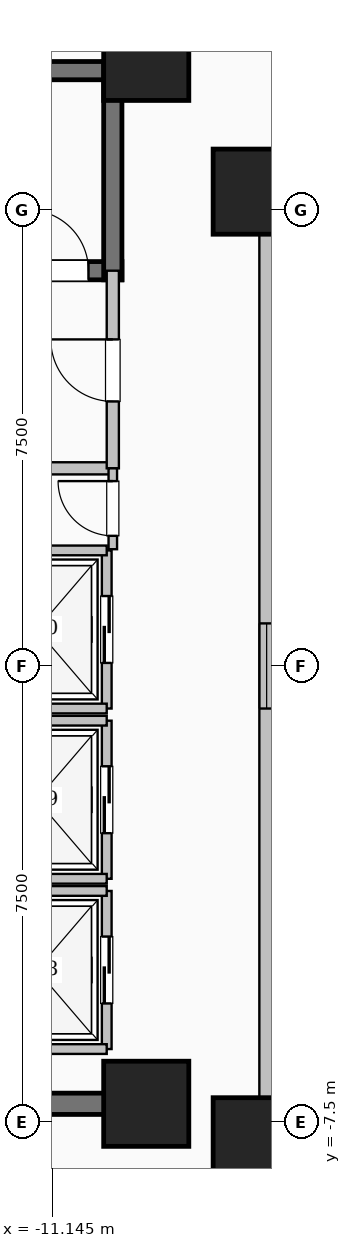
"""IFC4 building model, lengths in metres.
Left out: names, types, materials, properties, quantities, classifications, styles, units other than length and angle.
Written with IfcOpenShell. Run it as: python <this file> out.ifc"""

import sys

from ifc_helpers import new_model, si_unit, direction, frame, frame_2d, origin, origin_2d, place, context, subcontext, project, spatial, rectangle, extrude, element, fill, save


model = new_model("IFC4")
c1 = context("Model", 3, precision=1e-05, world=origin(), true_north=direction((0.0, 1.0)))
c2 = subcontext(c1, "Body", "Model", "MODEL_VIEW")
j1 = project(units=[si_unit("LENGTHUNIT", "METRE"), si_unit("PLANEANGLEUNIT", "RADIAN")], contexts=[c1])
p1 = place(None, origin())
s1 = spatial("IfcSite", under=j1, at=p1, CompositionType="ELEMENT")
p2 = place(p1, origin())
s2 = spatial("IfcBuilding", under=s1, at=p2, CompositionType="ELEMENT")
p3 = place(p2, frame((0.0, 0.0, 5.4)))
s3 = spatial("IfcBuildingStorey", under=s2, at=p3, CompositionType="ELEMENT", Elevation=5.4)
for number, where, z_axis, x_axis in (
    (1, (-7.8, -7.8, 0.0), (0.0, 0.0, 1.0), (1.0, 0.0, 0.0)),
    (2, (-7.8, 7.8, 0.0), (0.0, 0.0, 1.0), (1.0, 0.0, 0.0)),
    (3, (-9.6, -7.2, 0.0), (0.0, 0.0, 1.0), (1.0, 0.0, 0.0)),
    (4, (-9.6, 10.0, 0.0), (0.0, 0.0, 1.0), (1.0, 0.0, 0.0)),
):
    element("IfcColumn", number, at=place(p3, frame(where, z_axis=z_axis, x_axis=x_axis)), inside=s3, PredefinedType="COLUMN", context=c2, shape_type="SweptSolid", body=[
        extrude(rectangle(XDim=1.4, YDim=1.4, at=origin_2d()), origin(), (0.0, 0.0, 1.0), 4.5),
    ])
p4 = place(p3, frame((-7.62, -7.62, 0.0), z_axis=(0.0, 0.0, 1.0), x_axis=(1.0, 0.0, 0.0)))
e5 = element("IfcWall", 5, at=p4, inside=s3, PredefinedType="SOLIDWALL", context=c2, shape_type="SweptSolid", body=[
    extrude(rectangle(XDim=15.24, YDim=0.24, at=frame_2d((7.62, 0.0))), origin(), (0.0, 0.0, 1.0), 4.2),
])
p5 = place(p4, frame((6.92, 0.0, 0.95)))
e6 = element("IfcOpeningElement", 6, at=p5, cuts=e5, PredefinedType="OPENING", context=c2, shape_type="SweptSolid", body=[
    extrude(rectangle(XDim=1.4, YDim=1.5, at=frame_2d((0.7, 0.75))), frame((0.0, 0.13, 0.0), z_axis=(0.0, -1.0, 0.0), x_axis=(1.0, 0.0, 0.0)), (0.0, 0.0, 1.0), 0.26),
])
p6 = place(p3, frame((7.62, 7.62, 0.0), z_axis=(0.0, 0.0, 1.0), x_axis=(-1.0, 0.0, 0.0)))
e7 = element("IfcWall", 7, at=p6, inside=s3, PredefinedType="SOLIDWALL", context=c2, shape_type="SweptSolid", body=[
    extrude(rectangle(XDim=15.24, YDim=0.24, at=frame_2d((7.62, 0.0))), origin(), (0.0, 0.0, 1.0), 4.2),
])
p7 = place(p6, frame((6.92, 0.0, 0.95)))
e8 = element("IfcOpeningElement", 8, at=p7, cuts=e7, PredefinedType="OPENING", context=c2, shape_type="SweptSolid", body=[
    extrude(rectangle(XDim=1.4, YDim=1.5, at=frame_2d((0.7, 0.75))), frame((0.0, 0.13, 0.0), z_axis=(0.0, -1.0, 0.0), x_axis=(1.0, 0.0, 0.0)), (0.0, 0.0, 1.0), 0.26),
])
p8 = place(p3, frame((-7.62, 7.62, 0.0), z_axis=(0.0, 0.0, 1.0), x_axis=(0.0, -1.0, 0.0)))
e9 = element("IfcWall", 9, at=p8, inside=s3, PredefinedType="SOLIDWALL", context=c2, shape_type="SweptSolid", body=[
    extrude(rectangle(XDim=15.24, YDim=0.24, at=frame_2d((7.62, 0.0))), origin(), (0.0, 0.0, 1.0), 4.2),
])
p9 = place(p8, frame((6.92, 0.0, 0.95)))
e10 = element("IfcOpeningElement", 10, at=p9, cuts=e9, PredefinedType="OPENING", context=c2, shape_type="SweptSolid", body=[
    extrude(rectangle(XDim=1.4, YDim=1.5, at=frame_2d((0.7, 0.75))), frame((0.0, 0.13, 0.0), z_axis=(0.0, -1.0, 0.0), x_axis=(1.0, 0.0, 0.0)), (0.0, 0.0, 1.0), 0.26),
])
p10 = place(p3, frame((-18.0, 9.79, 0.0), z_axis=(0.0, 0.0, 1.0), x_axis=(1.0, 0.0, 0.0)))
e11 = element("IfcWall", 11, at=p10, inside=s3, PredefinedType="SHEAR", context=c2, shape_type="SweptSolid", body=[
    extrude(rectangle(XDim=8.0, YDim=0.3, at=frame_2d((4.0, 0.0))), origin(), (0.0, 0.0, 1.0), 4.5),
])
p11 = place(p3, frame((-18.0, 6.5, 0.0), z_axis=(0.0, 0.0, 1.0), x_axis=(1.0, 0.0, 0.0)))
e12 = element("IfcWall", 12, at=p11, inside=s3, PredefinedType="SHEAR", context=c2, shape_type="SweptSolid", body=[
    extrude(rectangle(XDim=8.0, YDim=0.3, at=frame_2d((4.0, 0.0))), origin(), (0.0, 0.0, 1.0), 4.5),
])
p12 = place(p11, frame((6.45, 0.0, 0.0)))
e13 = element("IfcOpeningElement", 13, at=p12, cuts=e12, PredefinedType="OPENING", context=c2, shape_type="SweptSolid", body=[
    extrude(rectangle(XDim=1.0, YDim=2.15, at=frame_2d((0.5, 1.075))), frame((0.0, 0.16, 0.0), z_axis=(0.0, -1.0, 0.0), x_axis=(1.0, 0.0, 0.0)), (0.0, 0.0, 1.0), 0.32),
])
p13 = place(p3, frame((-10.15, 6.35, 0.0), z_axis=(0.0, 0.0, 1.0), x_axis=(0.0, 1.0, 0.0)))
e14 = element("IfcWall", 14, at=p13, inside=s3, PredefinedType="SHEAR", context=c2, shape_type="SweptSolid", body=[
    extrude(rectangle(XDim=3.59, YDim=0.3, at=frame_2d((1.795, 0.0))), origin(), (0.0, 0.0, 1.0), 4.5),
])
p14 = place(p3, frame((-15.55, 3.25, 0.0), z_axis=(0.0, 0.0, 1.0), x_axis=(1.0, 0.0, 0.0)))
e15 = element("IfcWall", 15, at=p14, inside=s3, PredefinedType="SOLIDWALL", context=c2, shape_type="SweptSolid", body=[
    extrude(rectangle(XDim=5.4, YDim=0.2, at=frame_2d((2.7, 0.0))), origin(), (0.0, 0.0, 1.0), 4.2),
])
p15 = place(p3, frame((-10.15, 3.25, 0.0), z_axis=(0.0, 0.0, 1.0), x_axis=(0.0, 1.0, 0.0)))
e16 = element("IfcWall", 16, at=p15, inside=s3, PredefinedType="SOLIDWALL", context=c2, shape_type="SweptSolid", body=[
    extrude(rectangle(XDim=3.25, YDim=0.2, at=frame_2d((1.625, 0.0))), origin(), (0.0, 0.0, 1.0), 4.2),
])
p16 = place(p15, frame((1.1, 0.0, 0.0)))
e17 = element("IfcOpeningElement", 17, at=p16, cuts=e16, PredefinedType="OPENING", context=c2, shape_type="SweptSolid", body=[
    extrude(rectangle(XDim=1.02, YDim=2.15, at=frame_2d((0.51, 1.075))), frame((0.0, 0.11, 0.0), z_axis=(0.0, -1.0, 0.0), x_axis=(1.0, 0.0, 0.0)), (0.0, 0.0, 1.0), 0.22),
])
p17 = place(p3, frame((-10.25, -6.3, 0.0), z_axis=(0.0, 0.0, 1.0), x_axis=(0.0, 1.0, 0.0)))
e18 = element("IfcWall", 18, at=p17, inside=s3, PredefinedType="SOLIDWALL", context=c2, shape_type="SweptSolid", body=[
    extrude(rectangle(XDim=2.6, YDim=0.16, at=frame_2d((1.3, 0.0))), origin(), (0.0, 0.0, 1.0), 4.2),
])
p18 = place(p17, frame((0.75, 0.0, 0.0)))
e19 = element("IfcOpeningElement", 19, at=p18, cuts=e18, PredefinedType="OPENING", context=c2, shape_type="SweptSolid", body=[
    extrude(rectangle(XDim=1.1, YDim=2.15, at=frame_2d((0.55, 1.075))), frame((0.0, 0.09, 0.0), z_axis=(0.0, -1.0, 0.0), x_axis=(1.0, 0.0, 0.0)), (0.0, 0.0, 1.0), 0.18),
])
for number, where, z_axis, x_axis in (
    (20, (-12.55, -6.3, 0.0), (0.0, 0.0, 1.0), (1.0, 0.0, 0.0)),
    (21, (-12.55, -3.7, 0.0), (0.0, 0.0, 1.0), (1.0, 0.0, 0.0)),
):
    element("IfcWall", number, at=place(p3, frame(where, z_axis=z_axis, x_axis=x_axis)), inside=s3, PredefinedType="SOLIDWALL", context=c2, shape_type="SweptSolid", body=[
        extrude(rectangle(XDim=2.3, YDim=0.16, at=frame_2d((1.15, 0.0))), origin(), (0.0, 0.0, 1.0), 4.2),
    ])
p19 = place(p3, frame((-10.25, -3.5, 0.0), z_axis=(0.0, 0.0, 1.0), x_axis=(0.0, 1.0, 0.0)))
e22 = element("IfcWall", 22, at=p19, inside=s3, PredefinedType="SOLIDWALL", context=c2, shape_type="SweptSolid", body=[
    extrude(rectangle(XDim=2.6, YDim=0.16, at=frame_2d((1.3, 0.0))), origin(), (0.0, 0.0, 1.0), 4.2),
])
p20 = place(p19, frame((0.75, 0.0, 0.0)))
e23 = element("IfcOpeningElement", 23, at=p20, cuts=e22, PredefinedType="OPENING", context=c2, shape_type="SweptSolid", body=[
    extrude(rectangle(XDim=1.1, YDim=2.15, at=frame_2d((0.55, 1.075))), frame((0.0, 0.09, 0.0), z_axis=(0.0, -1.0, 0.0), x_axis=(1.0, 0.0, 0.0)), (0.0, 0.0, 1.0), 0.18),
])
for number, where, z_axis, x_axis in (
    (24, (-12.55, -3.5, 0.0), (0.0, 0.0, 1.0), (1.0, 0.0, 0.0)),
    (25, (-12.55, -0.9, 0.0), (0.0, 0.0, 1.0), (1.0, 0.0, 0.0)),
):
    element("IfcWall", number, at=place(p3, frame(where, z_axis=z_axis, x_axis=x_axis)), inside=s3, PredefinedType="SOLIDWALL", context=c2, shape_type="SweptSolid", body=[
        extrude(rectangle(XDim=2.3, YDim=0.16, at=frame_2d((1.15, 0.0))), origin(), (0.0, 0.0, 1.0), 4.2),
    ])
p21 = place(p3, frame((-10.25, -0.7, 0.0), z_axis=(0.0, 0.0, 1.0), x_axis=(0.0, 1.0, 0.0)))
e26 = element("IfcWall", 26, at=p21, inside=s3, PredefinedType="SOLIDWALL", context=c2, shape_type="SweptSolid", body=[
    extrude(rectangle(XDim=2.6, YDim=0.16, at=frame_2d((1.3, 0.0))), origin(), (0.0, 0.0, 1.0), 4.2),
])
p22 = place(p21, frame((0.75, 0.0, 0.0)))
e27 = element("IfcOpeningElement", 27, at=p22, cuts=e26, PredefinedType="OPENING", context=c2, shape_type="SweptSolid", body=[
    extrude(rectangle(XDim=1.1, YDim=2.15, at=frame_2d((0.55, 1.075))), frame((0.0, 0.09, 0.0), z_axis=(0.0, -1.0, 0.0), x_axis=(1.0, 0.0, 0.0)), (0.0, 0.0, 1.0), 0.18),
])
for number, where, z_axis, x_axis in (
    (28, (-12.55, -0.7, 0.0), (0.0, 0.0, 1.0), (1.0, 0.0, 0.0)),
    (29, (-12.55, 1.9, 0.0), (0.0, 0.0, 1.0), (1.0, 0.0, 0.0)),
):
    element("IfcWall", number, at=place(p3, frame(where, z_axis=z_axis, x_axis=x_axis)), inside=s3, PredefinedType="SOLIDWALL", context=c2, shape_type="SweptSolid", body=[
        extrude(rectangle(XDim=2.3, YDim=0.16, at=frame_2d((1.15, 0.0))), origin(), (0.0, 0.0, 1.0), 4.2),
    ])
p23 = place(p3, frame((-18.625, -7.2, 0.0), z_axis=(0.0, 0.0, 1.0), x_axis=(1.0, 0.0, 0.0)))
e30 = element("IfcWall", 30, at=p23, inside=s3, PredefinedType="SHEAR", context=c2, shape_type="SweptSolid", body=[
    extrude(rectangle(XDim=8.55, YDim=0.35, at=frame_2d((4.275, 0.0))), origin(), (0.0, 0.0, 1.0), 4.5),
])
p24 = place(p3, frame((-10.15, 1.92, 0.0), z_axis=(0.0, 0.0, 1.0), x_axis=(0.0, 1.0, 0.0)))
e31 = element("IfcWall", 31, at=p24, inside=s3, PredefinedType="PARTITIONING", context=c2, shape_type="SweptSolid", body=[
    extrude(rectangle(XDim=1.33, YDim=0.14, at=frame_2d((0.665, 0.0))), origin(), (0.0, 0.0, 1.0), 4.2),
])
p25 = place(p24, frame((0.22, 0.0, 0.0)))
e32 = element("IfcOpeningElement", 32, at=p25, cuts=e31, PredefinedType="OPENING", context=c2, shape_type="SweptSolid", body=[
    extrude(rectangle(XDim=0.9, YDim=2.08, at=frame_2d((0.45, 1.04))), frame((0.0, 0.08, 0.0), z_axis=(0.0, -1.0, 0.0), x_axis=(1.0, 0.0, 0.0)), (0.0, 0.0, 1.0), 0.16),
])
p26 = place(p9, origin())
e33 = element("IfcWindow", 33, at=p26, inside=s3, PartitioningType="SINGLE_PANEL", PredefinedType="WINDOW", context=c2, shape_type="SweptSolid", body=[
    extrude(rectangle(XDim=1.4, YDim=1.5, at=frame_2d((0.7, 0.75))), frame((0.0, 0.03, 0.0), z_axis=(0.0, -1.0, 0.0), x_axis=(1.0, 0.0, 0.0)), (0.0, 0.0, 1.0), 0.06),
])
fill(e10, e33)
p27 = place(p12, origin())
e34 = element("IfcDoor", 34, at=p27, inside=s3, OperationType="SINGLE_SWING_LEFT", PredefinedType="DOOR", context=c2, shape_type="SweptSolid", body=[
    extrude(rectangle(XDim=1.0, YDim=2.15, at=frame_2d((0.5, 1.075))), frame((0.0, 0.025, 0.0), z_axis=(0.0, -1.0, 0.0), x_axis=(1.0, 0.0, 0.0)), (0.0, 0.0, 1.0), 0.05),
])
fill(e13, e34)
p28 = place(p16, origin())
e35 = element("IfcDoor", 35, at=p28, inside=s3, OperationType="SINGLE_SWING_RIGHT", PredefinedType="DOOR", context=c2, shape_type="SweptSolid", body=[
    extrude(rectangle(XDim=1.02, YDim=2.15, at=frame_2d((0.51, 1.075))), frame((0.0, 0.025, 0.0), z_axis=(0.0, -1.0, 0.0), x_axis=(1.0, 0.0, 0.0)), (0.0, 0.0, 1.0), 0.05),
])
fill(e17, e35)
p29 = place(p18, origin())
e36 = element("IfcDoor", 36, at=p29, inside=s3, OperationType="SLIDING_TO_LEFT", PredefinedType="DOOR", context=c2, shape_type="SweptSolid", body=[
    extrude(rectangle(XDim=1.1, YDim=2.15, at=frame_2d((0.55, 1.075))), frame((0.0, 0.025, 0.0), z_axis=(0.0, -1.0, 0.0), x_axis=(1.0, 0.0, 0.0)), (0.0, 0.0, 1.0), 0.05),
])
fill(e19, e36)
p30 = place(p20, origin())
e37 = element("IfcDoor", 37, at=p30, inside=s3, OperationType="SLIDING_TO_LEFT", PredefinedType="DOOR", context=c2, shape_type="SweptSolid", body=[
    extrude(rectangle(XDim=1.1, YDim=2.15, at=frame_2d((0.55, 1.075))), frame((0.0, 0.025, 0.0), z_axis=(0.0, -1.0, 0.0), x_axis=(1.0, 0.0, 0.0)), (0.0, 0.0, 1.0), 0.05),
])
fill(e23, e37)
p31 = place(p22, origin())
e38 = element("IfcDoor", 38, at=p31, inside=s3, OperationType="SLIDING_TO_LEFT", PredefinedType="DOOR", context=c2, shape_type="SweptSolid", body=[
    extrude(rectangle(XDim=1.1, YDim=2.15, at=frame_2d((0.55, 1.075))), frame((0.0, 0.025, 0.0), z_axis=(0.0, -1.0, 0.0), x_axis=(1.0, 0.0, 0.0)), (0.0, 0.0, 1.0), 0.05),
])
fill(e27, e38)
p32 = place(p25, origin())
e39 = element("IfcDoor", 39, at=p32, inside=s3, OperationType="SINGLE_SWING_RIGHT", PredefinedType="DOOR", context=c2, shape_type="SweptSolid", body=[
    extrude(rectangle(XDim=0.9, YDim=2.08, at=frame_2d((0.45, 1.04))), frame((0.0, 0.025, 0.0), z_axis=(0.0, -1.0, 0.0), x_axis=(1.0, 0.0, 0.0)), (0.0, 0.0, 1.0), 0.05),
])
fill(e32, e39)
save(model, sys.argv[1])
